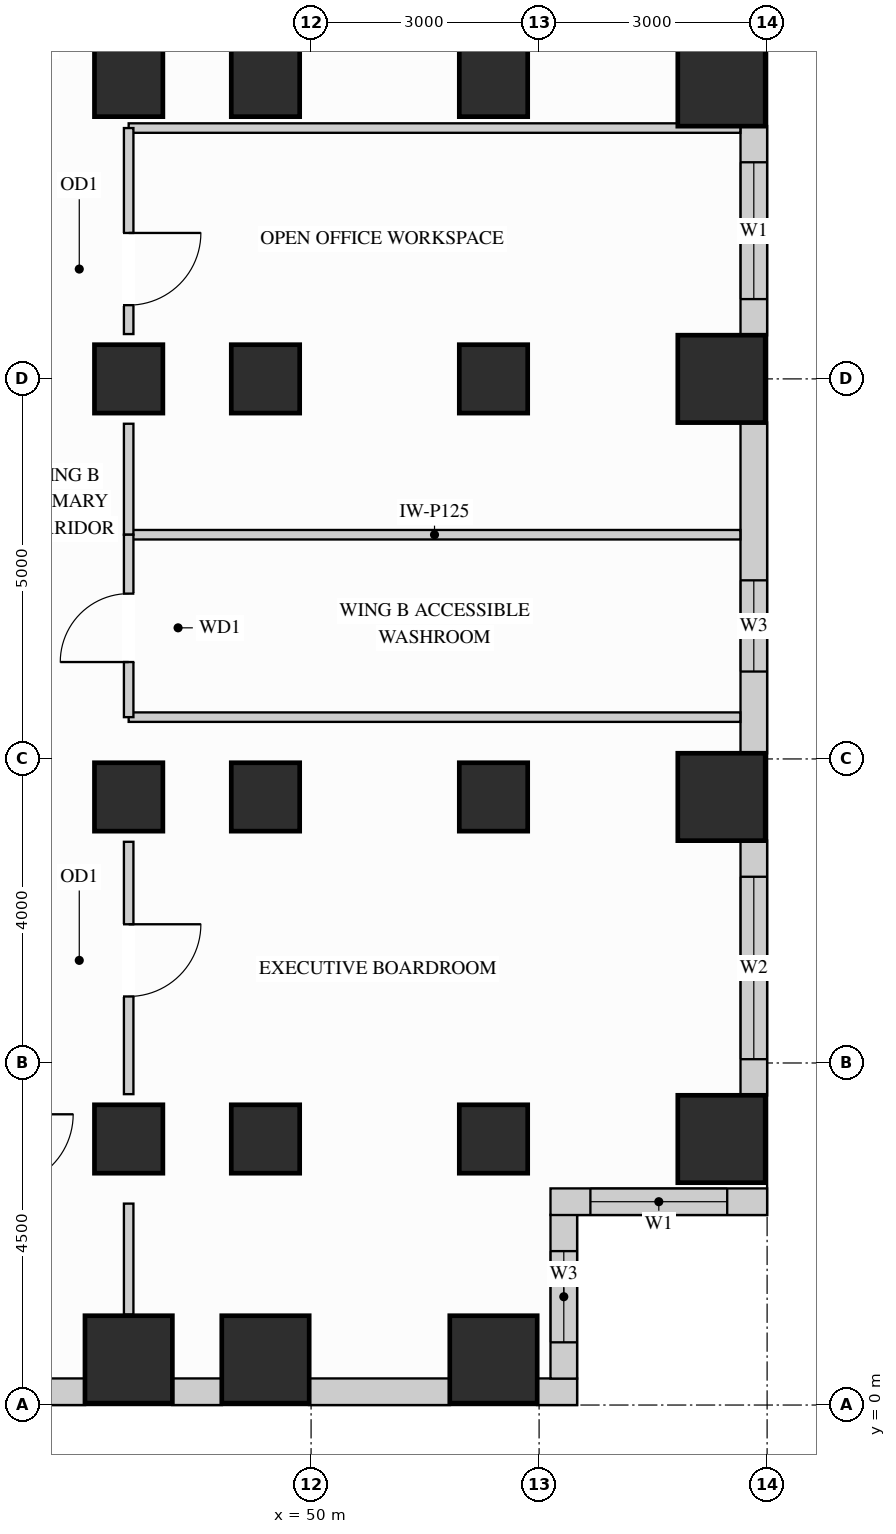
"""IFC4 building model, lengths in metres.
Left out: names, types, materials, properties, quantities, classifications, styles, units other than length and angle.
Written with IfcOpenShell. Run it as: python <this file> out.ifc"""

import sys

from ifc_helpers import new_model, si_unit, direction, frame, frame_2d, origin, origin_2d, place, context, subcontext, project, spatial, rectangle, extrude, source, transform, mapped, element, fill, save


model = new_model("IFC4")
c1 = context("Model", 3, precision=1e-05, world=origin(), true_north=direction((0.0, 1.0)))
c2 = subcontext(c1, "Body", "Model", "MODEL_VIEW")
j1 = project(units=[si_unit("LENGTHUNIT", "METRE"), si_unit("PLANEANGLEUNIT", "RADIAN")], contexts=[c1])
p1 = place(None, origin())
s1 = spatial("IfcSite", under=j1, at=p1, CompositionType="ELEMENT")
p2 = place(p1, origin())
s2 = spatial("IfcBuilding", under=s1, at=p2, CompositionType="ELEMENT")
p3 = place(p2, frame((0.0, 0.0, 81.0)))
s3 = spatial("IfcBuildingStorey", under=s2, at=p3, CompositionType="ELEMENT", Elevation=81.0)
m1 = source(origin(), c2, "Body", "SweptSolid", [
    extrude(rectangle(XDim=0.9, YDim=0.9, at=origin_2d()), origin(), (0.0, 0.0, 1.0), 3.38),
])
for number, where, z_axis, x_axis in (
    (1, (47.6, 13.5, 0.0), (0.0, 0.0, 1.0), (1.0, 0.0, 0.0)),
    (2, (47.6, 3.5, 0.0), (0.0, 0.0, 1.0), (1.0, 0.0, 0.0)),
    (3, (47.6, 8.0, 0.0), (0.0, 0.0, 1.0), (1.0, 0.0, 0.0)),
    (4, (47.6, 17.4, 0.0), (0.0, 0.0, 1.0), (1.0, 0.0, 0.0)),
    (5, (49.4, 13.5, 0.0), (0.0, 0.0, 1.0), (1.0, 0.0, 0.0)),
    (6, (49.4, 17.4, 0.0), (0.0, 0.0, 1.0), (1.0, 0.0, 0.0)),
    (7, (49.4, 3.5, 0.0), (0.0, 0.0, 1.0), (1.0, 0.0, 0.0)),
    (8, (49.4, 8.0, 0.0), (0.0, 0.0, 1.0), (1.0, 0.0, 0.0)),
    (9, (52.4, 13.5, 0.0), (0.0, 0.0, 1.0), (1.0, 0.0, 0.0)),
    (10, (52.4, 17.4, 0.0), (0.0, 0.0, 1.0), (1.0, 0.0, 0.0)),
    (11, (52.4, 3.5, 0.0), (0.0, 0.0, 1.0), (1.0, 0.0, 0.0)),
    (12, (52.4, 8.0, 0.0), (0.0, 0.0, 1.0), (1.0, 0.0, 0.0)),
):
    element("IfcColumn", number, at=place(p3, frame(where, z_axis=z_axis, x_axis=x_axis)), inside=s3, PredefinedType="COLUMN", context=c2, shape_type="MappedRepresentation", body=[
        mapped(m1, transform((0.0, 0.0, 0.0), x_axis=(1.0, 0.0, 0.0), y_axis=(0.0, 1.0, 0.0), z_axis=(0.0, 0.0, 1.0))),
    ])
m2 = source(origin(), c2, "Body", "SweptSolid", [
    extrude(rectangle(XDim=1.15, YDim=1.15, at=origin_2d()), origin(), (0.0, 0.0, 1.0), 3.38),
])
for number, where, z_axis, x_axis in (
    (13, (55.4, 13.5, 0.0), (0.0, 0.0, 1.0), (1.0, 0.0, 0.0)),
    (14, (55.4, 17.4, 0.0), (0.0, 0.0, 1.0), (1.0, 0.0, 0.0)),
    (15, (55.4, 3.5, 0.0), (0.0, 0.0, 1.0), (1.0, 0.0, 0.0)),
    (16, (55.4, 8.0, 0.0), (0.0, 0.0, 1.0), (1.0, 0.0, 0.0)),
    (17, (47.6, 0.6, 0.0), (0.0, 0.0, 1.0), (1.0, 0.0, 0.0)),
    (18, (49.4, 0.6, 0.0), (0.0, 0.0, 1.0), (1.0, 0.0, 0.0)),
    (19, (52.4, 0.6, 0.0), (0.0, 0.0, 1.0), (1.0, 0.0, 0.0)),
):
    element("IfcColumn", number, at=place(p3, frame(where, z_axis=z_axis, x_axis=x_axis)), inside=s3, PredefinedType="COLUMN", context=c2, shape_type="MappedRepresentation", body=[
        mapped(m2, transform((0.0, 0.0, 0.0), x_axis=(1.0, 0.0, 0.0), y_axis=(0.0, 1.0, 0.0), z_axis=(0.0, 0.0, 1.0))),
    ])
p4 = place(p3, frame((40.573, 0.175, 0.0), z_axis=(0.0, 0.0, 1.0), x_axis=(1.0, 0.0, 0.0)))
e20 = element("IfcWall", 20, at=p4, inside=s3, PredefinedType="SOLIDWALL", context=c2, shape_type="SweptSolid", body=[
    extrude(rectangle(XDim=6.454, YDim=0.35, at=frame_2d((3.227, 0.0))), origin(), (0.0, 0.0, 1.0), 3.365),
])
p5 = place(p4, frame((0.712, 0.0, 0.78)))
e21 = element("IfcOpeningElement", 21, at=p5, cuts=e20, PredefinedType="OPENING", context=c2, shape_type="SweptSolid", body=[
    extrude(rectangle(XDim=1.8, YDim=2.1, at=frame_2d((0.9, 1.05))), frame((0.0, 0.185, 0.0), z_axis=(0.0, -1.0, 0.0), x_axis=(1.0, 0.0, 0.0)), (0.0, 0.0, 1.0), 0.37),
])
p6 = place(p4, frame((2.905, 0.0, 0.78)))
e22 = element("IfcOpeningElement", 22, at=p6, cuts=e20, PredefinedType="OPENING", context=c2, shape_type="SweptSolid", body=[
    extrude(rectangle(XDim=1.8, YDim=2.1, at=frame_2d((0.9, 1.05))), frame((0.0, 0.185, 0.0), z_axis=(0.0, -1.0, 0.0), x_axis=(1.0, 0.0, 0.0)), (0.0, 0.0, 1.0), 0.37),
])
m3 = source(origin(), c2, "Body", "SweptSolid", [
    extrude(rectangle(XDim=0.654, YDim=0.35, at=frame_2d((0.327, 0.0))), origin(), (0.0, 0.0, 1.0), 3.365),
])
p7 = place(p3, frame((48.173, 0.175, 0.0), z_axis=(0.0, 0.0, 1.0), x_axis=(1.0, 0.0, 0.0)))
e23 = element("IfcWall", 23, at=p7, inside=s3, PredefinedType="SOLIDWALL", context=c2, shape_type="MappedRepresentation", body=[
    mapped(m3, transform((0.0, 0.0, 0.0), x_axis=(1.0, 0.0, 0.0), y_axis=(0.0, 1.0, 0.0), z_axis=(0.0, 0.0, 1.0))),
])
m4 = source(origin(), c2, "Body", "SweptSolid", [
    extrude(rectangle(XDim=1.854, YDim=0.35, at=frame_2d((0.927, 0.0))), origin(), (0.0, 0.0, 1.0), 3.365),
])
p8 = place(p3, frame((49.973, 0.175, 0.0), z_axis=(0.0, 0.0, 1.0), x_axis=(1.0, 0.0, 0.0)))
e24 = element("IfcWall", 24, at=p8, inside=s3, PredefinedType="SOLIDWALL", context=c2, shape_type="MappedRepresentation", body=[
    mapped(m4, transform((0.0, 0.0, 0.0), x_axis=(1.0, 0.0, 0.0), y_axis=(0.0, 1.0, 0.0), z_axis=(0.0, 0.0, 1.0))),
])
m5 = source(origin(), c2, "Body", "SweptSolid", [
    extrude(rectangle(XDim=0.527, YDim=0.35, at=frame_2d((0.264, 0.0))), origin(), (0.0, 0.0, 1.0), 3.365),
])
p9 = place(p3, frame((52.973, 0.175, 0.0), z_axis=(0.0, 0.0, 1.0), x_axis=(1.0, 0.0, 0.0)))
e25 = element("IfcWall", 25, at=p9, inside=s3, PredefinedType="SOLIDWALL", context=c2, shape_type="MappedRepresentation", body=[
    mapped(m5, transform((0.0, 0.0, 0.0), x_axis=(1.0, 0.0, 0.0), y_axis=(0.0, 1.0, 0.0), z_axis=(0.0, 0.0, 1.0))),
])
p10 = place(p3, frame((53.325, 0.348, 0.0), z_axis=(0.0, 0.0, 1.0), x_axis=(0.0, 1.0, 0.0)))
e26 = element("IfcWall", 26, at=p10, inside=s3, PredefinedType="SOLIDWALL", context=c2, shape_type="SweptSolid", body=[
    extrude(rectangle(XDim=2.154, YDim=0.35, at=frame_2d((1.077, 0.0))), origin(), (0.0, 0.0, 1.0), 3.365),
])
p11 = place(p10, frame((0.477, 0.0, 0.78)))
e27 = element("IfcOpeningElement", 27, at=p11, cuts=e26, PredefinedType="OPENING", context=c2, shape_type="SweptSolid", body=[
    extrude(rectangle(XDim=1.2, YDim=2.1, at=frame_2d((0.6, 1.05))), frame((0.0, 0.185, 0.0), z_axis=(0.0, -1.0, 0.0), x_axis=(1.0, 0.0, 0.0)), (0.0, 0.0, 1.0), 0.37),
])
p12 = place(p3, frame((53.15, 2.675, 0.0), z_axis=(0.0, 0.0, 1.0), x_axis=(1.0, 0.0, 0.0)))
e28 = element("IfcWall", 28, at=p12, inside=s3, PredefinedType="SOLIDWALL", context=c2, shape_type="SweptSolid", body=[
    extrude(rectangle(XDim=2.85, YDim=0.35, at=frame_2d((1.425, 0.0))), origin(), (0.0, 0.0, 1.0), 3.365),
])
p13 = place(p12, frame((0.525, 0.0, 0.78)))
e29 = element("IfcOpeningElement", 29, at=p13, cuts=e28, PredefinedType="OPENING", context=c2, shape_type="SweptSolid", body=[
    extrude(rectangle(XDim=1.8, YDim=2.1, at=frame_2d((0.9, 1.05))), frame((0.0, 0.185, 0.0), z_axis=(0.0, -1.0, 0.0), x_axis=(1.0, 0.0, 0.0)), (0.0, 0.0, 1.0), 0.37),
])
p14 = place(p3, frame((55.825, 4.073, 0.0), z_axis=(0.0, 0.0, 1.0), x_axis=(0.0, 1.0, 0.0)))
e30 = element("IfcWall", 30, at=p14, inside=s3, PredefinedType="SOLIDWALL", context=c2, shape_type="SweptSolid", body=[
    extrude(rectangle(XDim=3.354, YDim=0.35, at=frame_2d((1.677, 0.0))), origin(), (0.0, 0.0, 1.0), 3.365),
])
p15 = place(p14, frame((0.477, 0.0, 0.78)))
e31 = element("IfcOpeningElement", 31, at=p15, cuts=e30, PredefinedType="OPENING", context=c2, shape_type="SweptSolid", body=[
    extrude(rectangle(XDim=2.4, YDim=2.1, at=frame_2d((1.2, 1.05))), frame((0.0, 0.185, 0.0), z_axis=(0.0, -1.0, 0.0), x_axis=(1.0, 0.0, 0.0)), (0.0, 0.0, 1.0), 0.37),
])
p16 = place(p3, frame((55.825, 8.573, 0.0), z_axis=(0.0, 0.0, 1.0), x_axis=(0.0, 1.0, 0.0)))
e32 = element("IfcWall", 32, at=p16, inside=s3, PredefinedType="SOLIDWALL", context=c2, shape_type="SweptSolid", body=[
    extrude(rectangle(XDim=4.354, YDim=0.35, at=frame_2d((2.177, 0.0))), origin(), (0.0, 0.0, 1.0), 3.365),
])
p17 = place(p16, frame((1.077, 0.0, 0.78)))
e33 = element("IfcOpeningElement", 33, at=p17, cuts=e32, PredefinedType="OPENING", context=c2, shape_type="SweptSolid", body=[
    extrude(rectangle(XDim=1.2, YDim=2.1, at=frame_2d((0.6, 1.05))), frame((0.0, 0.185, 0.0), z_axis=(0.0, -1.0, 0.0), x_axis=(1.0, 0.0, 0.0)), (0.0, 0.0, 1.0), 0.37),
])
p18 = place(p3, frame((55.825, 14.073, 0.0), z_axis=(0.0, 0.0, 1.0), x_axis=(0.0, 1.0, 0.0)))
e34 = element("IfcWall", 34, at=p18, inside=s3, PredefinedType="SOLIDWALL", context=c2, shape_type="SweptSolid", body=[
    extrude(rectangle(XDim=2.754, YDim=0.35, at=frame_2d((1.377, 0.0))), origin(), (0.0, 0.0, 1.0), 3.365),
])
p19 = place(p18, frame((0.477, 0.0, 0.78)))
e35 = element("IfcOpeningElement", 35, at=p19, cuts=e34, PredefinedType="OPENING", context=c2, shape_type="SweptSolid", body=[
    extrude(rectangle(XDim=1.8, YDim=2.1, at=frame_2d((0.9, 1.05))), frame((0.0, 0.185, 0.0), z_axis=(0.0, -1.0, 0.0), x_axis=(1.0, 0.0, 0.0)), (0.0, 0.0, 1.0), 0.37),
])
m6 = source(origin(), c2, "Body", "SweptSolid", [
    extrude(rectangle(XDim=8.048, YDim=0.125, at=frame_2d((4.024, 0.0))), origin(), (0.0, 0.0, 1.0), 3.365),
])
for number, where, z_axis, x_axis in (
    (36, (47.6, 11.45, 0.0), (0.0, 0.0, 1.0), (1.0, 0.0, 0.0)),
    (37, (47.6, 16.8, 0.0), (0.0, 0.0, 1.0), (1.0, 0.0, 0.0)),
    (38, (47.6, 9.05, 0.0), (0.0, 0.0, 1.0), (1.0, 0.0, 0.0)),
):
    element("IfcWall", number, at=place(p3, frame(where, z_axis=z_axis, x_axis=x_axis)), inside=s3, PredefinedType="PARTITIONING", context=c2, shape_type="MappedRepresentation", body=[
        mapped(m6, transform((0.0, 0.0, 0.0), x_axis=(1.0, 0.0, 0.0), y_axis=(0.0, 1.0, 0.0), z_axis=(0.0, 0.0, 1.0))),
    ])
p20 = place(p3, frame((47.6, 4.09, 0.0), z_axis=(0.0, 0.0, 1.0), x_axis=(0.0, 1.0, 0.0)))
e39 = element("IfcWall", 39, at=p20, inside=s3, PredefinedType="PARTITIONING", context=c2, shape_type="SweptSolid", body=[
    extrude(rectangle(XDim=3.32, YDim=0.125, at=frame_2d((1.66, 0.0))), origin(), (0.0, 0.0, 1.0), 2.677),
])
p21 = place(p20, frame((1.285, 0.0, 0.0)))
e40 = element("IfcOpeningElement", 40, at=p21, cuts=e39, PredefinedType="OPENING", context=c2, shape_type="SweptSolid", body=[
    extrude(rectangle(XDim=0.95, YDim=2.15, at=frame_2d((0.475, 1.075))), frame((0.0, 0.073, 0.0), z_axis=(0.0, -1.0, 0.0), x_axis=(1.0, 0.0, 0.0)), (0.0, 0.0, 1.0), 0.145),
])
m7 = source(origin(), c2, "Body", "SweptSolid", [
    extrude(rectangle(XDim=1.46, YDim=0.125, at=frame_2d((0.73, 0.0))), origin(), (0.0, 0.0, 1.0), 2.677),
])
for number, where, z_axis, x_axis in (
    (41, (47.6, 1.19, 0.0), (0.0, 0.0, 1.0), (0.0, 1.0, 0.0)),
    (42, (47.6, 11.45, 0.0), (0.0, 0.0, 1.0), (0.0, 1.0, 0.0)),
):
    element("IfcWall", number, at=place(p3, frame(where, z_axis=z_axis, x_axis=x_axis)), inside=s3, PredefinedType="PARTITIONING", context=c2, shape_type="MappedRepresentation", body=[
        mapped(m7, transform((0.0, 0.0, 0.0), x_axis=(1.0, 0.0, 0.0), y_axis=(0.0, 1.0, 0.0), z_axis=(0.0, 0.0, 1.0))),
    ])
p22 = place(p3, frame((47.6, 14.09, 0.0), z_axis=(0.0, 0.0, 1.0), x_axis=(0.0, 1.0, 0.0)))
e43 = element("IfcWall", 43, at=p22, inside=s3, PredefinedType="PARTITIONING", context=c2, shape_type="SweptSolid", body=[
    extrude(rectangle(XDim=2.71, YDim=0.125, at=frame_2d((1.355, 0.0))), origin(), (0.0, 0.0, 1.0), 2.677),
])
p23 = place(p22, frame((0.38, 0.0, 0.0)))
e44 = element("IfcOpeningElement", 44, at=p23, cuts=e43, PredefinedType="OPENING", context=c2, shape_type="SweptSolid", body=[
    extrude(rectangle(XDim=0.95, YDim=2.15, at=frame_2d((0.475, 1.075))), frame((0.0, 0.073, 0.0), z_axis=(0.0, -1.0, 0.0), x_axis=(1.0, 0.0, 0.0)), (0.0, 0.0, 1.0), 0.145),
])
p24 = place(p3, frame((47.6, 9.05, 0.0), z_axis=(0.0, 0.0, 1.0), x_axis=(0.0, 1.0, 0.0)))
e45 = element("IfcWall", 45, at=p24, inside=s3, PredefinedType="PARTITIONING", context=c2, shape_type="SweptSolid", body=[
    extrude(rectangle(XDim=2.4, YDim=0.125, at=frame_2d((1.2, 0.0))), origin(), (0.0, 0.0, 1.0), 2.677),
])
p25 = place(p24, frame((0.725, 0.0, 0.0)))
e46 = element("IfcOpeningElement", 46, at=p25, cuts=e45, PredefinedType="OPENING", context=c2, shape_type="SweptSolid", body=[
    extrude(rectangle(XDim=0.9, YDim=2.15, at=frame_2d((0.45, 1.075))), frame((0.0, 0.073, 0.0), z_axis=(0.0, -1.0, 0.0), x_axis=(1.0, 0.0, 0.0)), (0.0, 0.0, 1.0), 0.145),
])
m8 = source(origin(), c2, "Body", "SweptSolid", [
    extrude(rectangle(XDim=0.95, YDim=2.15, at=frame_2d((0.475, 1.075))), frame((0.0, 0.025, 0.0), z_axis=(0.0, -1.0, 0.0), x_axis=(1.0, 0.0, 0.0)), (0.0, 0.0, 1.0), 0.05),
])
p26 = place(p21, origin())
e47 = element("IfcDoor", 47, at=p26, inside=s3, OperationType="SINGLE_SWING_RIGHT", PredefinedType="DOOR", context=c2, shape_type="MappedRepresentation", body=[
    mapped(m8, transform((0.0, 0.0, 0.0), x_axis=(1.0, 0.0, 0.0), y_axis=(0.0, 1.0, 0.0), z_axis=(0.0, 0.0, 1.0))),
])
fill(e40, e47)
p27 = place(p23, origin())
e48 = element("IfcDoor", 48, at=p27, inside=s3, OperationType="SINGLE_SWING_RIGHT", PredefinedType="DOOR", context=c2, shape_type="MappedRepresentation", body=[
    mapped(m8, transform((0.0, 0.0, 0.0), x_axis=(1.0, 0.0, 0.0), y_axis=(0.0, 1.0, 0.0), z_axis=(0.0, 0.0, 1.0))),
])
fill(e44, e48)
m9 = source(origin(), c2, "Body", "SweptSolid", [
    extrude(rectangle(XDim=0.9, YDim=2.15, at=frame_2d((0.45, 1.075))), frame((0.0, 0.025, 0.0), z_axis=(0.0, -1.0, 0.0), x_axis=(1.0, 0.0, 0.0)), (0.0, 0.0, 1.0), 0.05),
])
p28 = place(p25, origin())
e49 = element("IfcDoor", 49, at=p28, inside=s3, OperationType="SINGLE_SWING_LEFT", PredefinedType="DOOR", context=c2, shape_type="MappedRepresentation", body=[
    mapped(m9, transform((0.0, 0.0, 0.0), x_axis=(1.0, 0.0, 0.0), y_axis=(0.0, 1.0, 0.0), z_axis=(0.0, 0.0, 1.0))),
])
fill(e46, e49)
m10 = source(origin(), c2, "Body", "SweptSolid", [
    extrude(rectangle(XDim=1.8, YDim=2.1, at=frame_2d((0.9, 1.05))), frame((0.0, 0.03, 0.0), z_axis=(0.0, -1.0, 0.0), x_axis=(1.0, 0.0, 0.0)), (0.0, 0.0, 1.0), 0.06),
])
p29 = place(p13, origin())
e50 = element("IfcWindow", 50, at=p29, inside=s3, PartitioningType="SINGLE_PANEL", PredefinedType="WINDOW", context=c2, shape_type="MappedRepresentation", body=[
    mapped(m10, transform((0.0, 0.0, 0.0), x_axis=(1.0, 0.0, 0.0), y_axis=(0.0, 1.0, 0.0), z_axis=(0.0, 0.0, 1.0))),
])
fill(e29, e50)
p30 = place(p19, origin())
e51 = element("IfcWindow", 51, at=p30, inside=s3, PartitioningType="SINGLE_PANEL", PredefinedType="WINDOW", context=c2, shape_type="MappedRepresentation", body=[
    mapped(m10, transform((0.0, 0.0, 0.0), x_axis=(1.0, 0.0, 0.0), y_axis=(0.0, 1.0, 0.0), z_axis=(0.0, 0.0, 1.0))),
])
fill(e35, e51)
m11 = source(origin(), c2, "Body", "SweptSolid", [
    extrude(rectangle(XDim=2.4, YDim=2.1, at=frame_2d((1.2, 1.05))), frame((0.0, 0.03, 0.0), z_axis=(0.0, -1.0, 0.0), x_axis=(1.0, 0.0, 0.0)), (0.0, 0.0, 1.0), 0.06),
])
p31 = place(p15, origin())
e52 = element("IfcWindow", 52, at=p31, inside=s3, PartitioningType="SINGLE_PANEL", PredefinedType="WINDOW", context=c2, shape_type="MappedRepresentation", body=[
    mapped(m11, transform((0.0, 0.0, 0.0), x_axis=(1.0, 0.0, 0.0), y_axis=(0.0, 1.0, 0.0), z_axis=(0.0, 0.0, 1.0))),
])
fill(e31, e52)
m12 = source(origin(), c2, "Body", "SweptSolid", [
    extrude(rectangle(XDim=1.2, YDim=2.1, at=frame_2d((0.6, 1.05))), frame((0.0, 0.03, 0.0), z_axis=(0.0, -1.0, 0.0), x_axis=(1.0, 0.0, 0.0)), (0.0, 0.0, 1.0), 0.06),
])
p32 = place(p11, origin())
e53 = element("IfcWindow", 53, at=p32, inside=s3, PartitioningType="SINGLE_PANEL", PredefinedType="WINDOW", context=c2, shape_type="MappedRepresentation", body=[
    mapped(m12, transform((0.0, 0.0, 0.0), x_axis=(1.0, 0.0, 0.0), y_axis=(0.0, 1.0, 0.0), z_axis=(0.0, 0.0, 1.0))),
])
fill(e27, e53)
p33 = place(p17, origin())
e54 = element("IfcWindow", 54, at=p33, inside=s3, PartitioningType="SINGLE_PANEL", PredefinedType="WINDOW", context=c2, shape_type="MappedRepresentation", body=[
    mapped(m12, transform((0.0, 0.0, 0.0), x_axis=(1.0, 0.0, 0.0), y_axis=(0.0, 1.0, 0.0), z_axis=(0.0, 0.0, 1.0))),
])
fill(e33, e54)
save(model, sys.argv[1])
